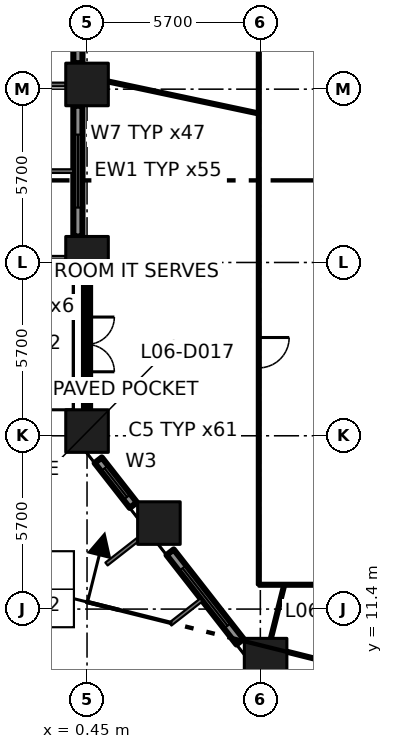
"""IFC4 building model, lengths in metres.
Left out: names, types, materials, properties, quantities, classifications, styles, units other than length and angle.
Written with IfcOpenShell. Run it as: python <this file> out.ifc"""

import sys

from ifc_helpers import new_model, si_unit, direction, frame, frame_2d, origin, origin_2d, place, context, subcontext, project, spatial, rectangle, extrude, element, fill, save


model = new_model("IFC4")
c1 = context("Model", 3, precision=1e-05, world=origin(), true_north=direction((0.0, 1.0)))
c2 = subcontext(c1, "Body", "Model", "MODEL_VIEW")
j1 = project(units=[si_unit("LENGTHUNIT", "METRE"), si_unit("PLANEANGLEUNIT", "RADIAN")], contexts=[c1])
p1 = place(None, origin())
s1 = spatial("IfcSite", under=j1, at=p1, CompositionType="ELEMENT")
p2 = place(p1, origin())
s2 = spatial("IfcBuilding", under=s1, at=p2, CompositionType="ELEMENT")
p3 = place(p2, frame((0.0, 0.0, 33.0)))
s3 = spatial("IfcBuildingStorey", under=s2, at=p3, CompositionType="ELEMENT", Elevation=33.0)
for number, where, z_axis, x_axis in (
    (1, (0.45, 17.255, 0.0), (0.0, 0.0, 1.0), (1.0, 0.0, 0.0)),
    (2, (0.45, 22.955, 0.0), (0.0, 0.0, 1.0), (1.0, 0.0, 0.0)),
    (3, (0.45, 28.655, 0.0), (0.0, 0.0, 1.0), (1.0, 0.0, 0.0)),
    (4, (6.323, 9.737, 0.0), (0.0, 0.0, 1.0), (1.0, 0.0, 0.0)),
    (5, (2.814, 14.229, 0.0), (0.0, 0.0, 1.0), (1.0, 0.0, 0.0)),
):
    element("IfcColumn", number, at=place(p3, frame(where, z_axis=z_axis, x_axis=x_axis)), inside=s3, PredefinedType="COLUMN", context=c2, shape_type="SweptSolid", body=[
        extrude(rectangle(XDim=1.4, YDim=1.4, at=origin_2d()), origin(), (0.0, 0.0, 1.0), 4.2),
    ])
p4 = place(p3, frame((0.15, 33.655, 0.0), z_axis=(0.0, 0.0, 1.0), x_axis=(0.0, -1.0, 0.0)))
e6 = element("IfcWall", 6, at=p4, inside=s3, PredefinedType="SOLIDWALL", context=c2, shape_type="SweptSolid", body=[
    extrude(rectangle(XDim=4.3, YDim=0.3, at=frame_2d((2.15, 0.0))), origin(), (0.0, 0.0, 1.0), 3.1),
])
p5 = place(p4, frame((0.95, 0.0, 0.8)))
e7 = element("IfcOpeningElement", 7, at=p5, cuts=e6, PredefinedType="OPENING", context=c2, shape_type="SweptSolid", body=[
    extrude(rectangle(XDim=2.4, YDim=2.1, at=frame_2d((1.2, 1.05))), frame((0.0, 0.16, 0.0), z_axis=(0.0, -1.0, 0.0), x_axis=(1.0, 0.0, 0.0)), (0.0, 0.0, 1.0), 0.32),
])
p6 = place(p3, frame((0.15, 27.955, 0.0), z_axis=(0.0, 0.0, 1.0), x_axis=(0.0, -1.0, 0.0)))
e8 = element("IfcWall", 8, at=p6, inside=s3, PredefinedType="SOLIDWALL", context=c2, shape_type="SweptSolid", body=[
    extrude(rectangle(XDim=4.3, YDim=0.3, at=frame_2d((2.15, 0.0))), origin(), (0.0, 0.0, 1.0), 3.1),
])
p7 = place(p6, frame((0.95, 0.0, 0.8)))
e9 = element("IfcOpeningElement", 9, at=p7, cuts=e8, PredefinedType="OPENING", context=c2, shape_type="SweptSolid", body=[
    extrude(rectangle(XDim=2.4, YDim=2.1, at=frame_2d((1.2, 1.05))), frame((0.0, 0.16, 0.0), z_axis=(0.0, -1.0, 0.0), x_axis=(1.0, 0.0, 0.0)), (0.0, 0.0, 1.0), 0.32),
])
p8 = place(p3, frame((0.45, 22.254, 0.0), z_axis=(0.0, 0.0, 1.0), x_axis=(0.0, -1.0, 0.0)))
e10 = element("IfcWall", 10, at=p8, inside=s3, PredefinedType="SOLIDWALL", context=c2, shape_type="SweptSolid", body=[
    extrude(rectangle(XDim=4.298, YDim=0.2, at=frame_2d((2.149, 0.0))), origin(), (0.0, 0.0, 1.0), 3.1),
])
p9 = place(p8, frame((1.249, 0.0, 0.0)))
e11 = element("IfcOpeningElement", 11, at=p9, cuts=e10, PredefinedType="OPENING", context=c2, shape_type="SweptSolid", body=[
    extrude(rectangle(XDim=1.8, YDim=2.9, at=frame_2d((0.9, 1.45))), frame((0.0, 0.11, 0.0), z_axis=(0.0, -1.0, 0.0), x_axis=(1.0, 0.0, 0.0)), (0.0, 0.0, 1.0), 0.22),
])
p10 = place(p3, frame((0.818, 16.296, 0.0), z_axis=(0.0, 0.0, 1.0), x_axis=(0.615985155343, -0.787757759973, 0.0)))
e12 = element("IfcWall", 12, at=p10, inside=s3, PredefinedType="SOLIDWALL", context=c2, shape_type="SweptSolid", body=[
    extrude(rectangle(XDim=1.875, YDim=0.3, at=frame_2d((0.938, 0.0))), origin(), (0.0, 0.0, 1.0), 3.1),
])
p11 = place(p10, frame((0.337, 0.0, 0.8)))
e13 = element("IfcOpeningElement", 13, at=p11, cuts=e12, PredefinedType="OPENING", context=c2, shape_type="SweptSolid", body=[
    extrude(rectangle(XDim=1.2, YDim=2.1, at=frame_2d((0.6, 1.05))), frame((0.0, 0.16, 0.0), z_axis=(0.0, -1.0, 0.0), x_axis=(1.0, 0.0, 0.0)), (0.0, 0.0, 1.0), 0.32),
])
p12 = place(p3, frame((3.183, 13.27, 0.0), z_axis=(0.0, 0.0, 1.0), x_axis=(0.615564114897, -0.788086810225, 0.0)))
e14 = element("IfcWall", 14, at=p12, inside=s3, PredefinedType="SOLIDWALL", context=c2, shape_type="SweptSolid", body=[
    extrude(rectangle(XDim=3.735, YDim=0.3, at=frame_2d((1.867, 0.0))), origin(), (0.0, 0.0, 1.0), 3.1),
])
p13 = place(p12, frame((0.667, 0.0, 0.8)))
e15 = element("IfcOpeningElement", 15, at=p13, cuts=e14, PredefinedType="OPENING", context=c2, shape_type="SweptSolid", body=[
    extrude(rectangle(XDim=2.4, YDim=2.1, at=frame_2d((1.2, 1.05))), frame((0.0, 0.16, 0.0), z_axis=(0.0, -1.0, 0.0), x_axis=(1.0, 0.0, 0.0)), (0.0, 0.0, 1.0), 0.32),
])
p14 = place(p3, frame((11.707, -11.659, 0.0), z_axis=(0.0, 0.0, 1.0), x_axis=(-0.61565155533, 0.788018503856, 0.0)))
e16 = element("IfcWall", 16, at=p14, inside=s3, PredefinedType="PARAPET", context=c2, shape_type="SweptSolid", body=[
    extrude(rectangle(XDim=32.79, YDim=0.25, at=frame_2d((16.395, 0.0))), origin(), (0.0, 0.0, 1.0), 1.2),
])
for number, where, z_axis, x_axis in (
    (17, (-0.25, 22.855, 0.0), (0.0, 0.0, 1.0), (-1.0, 0.0, 0.0)),
    (18, (-0.25, 17.355, 0.0), (0.0, 0.0, 1.0), (-1.0, 0.0, 0.0)),
):
    element("IfcWall", number, at=place(p3, frame(where, z_axis=z_axis, x_axis=x_axis)), inside=s3, PredefinedType="SOLIDWALL", context=c2, shape_type="SweptSolid", body=[
        extrude(rectangle(XDim=2.65, YDim=1.2, at=frame_2d((1.325, 0.0))), origin(), (0.0, 0.0, 1.0), 0.6),
    ])
p15 = place(p3, frame((6.1, 12.2, 0.0), z_axis=(0.0, 0.0, 1.0), x_axis=(1.0, 0.0, 0.0)))
e19 = element("IfcWall", 19, at=p15, inside=s3, PredefinedType="PARTITIONING", context=c2, shape_type="SweptSolid", body=[
    extrude(rectangle(XDim=3.8, YDim=0.1, at=frame_2d((1.9, 0.0))), origin(), (0.0, 0.0, 1.0), 3.9),
])
p16 = place(p15, frame((1.902, 0.0, 0.0)))
e20 = element("IfcOpeningElement", 20, at=p16, cuts=e19, PredefinedType="OPENING", context=c2, shape_type="SweptSolid", body=[
    extrude(rectangle(XDim=1.0, YDim=2.1, at=frame_2d((0.5, 1.05))), frame((0.0, 0.06, 0.0), z_axis=(0.0, -1.0, 0.0), x_axis=(1.0, 0.0, 0.0)), (0.0, 0.0, 1.0), 0.12),
])
p17 = place(p3, frame((6.1, 38.9, 0.0), z_axis=(0.0, 0.0, 1.0), x_axis=(0.0, -1.0, 0.0)))
e21 = element("IfcWall", 21, at=p17, inside=s3, PredefinedType="PARTITIONING", context=c2, shape_type="SweptSolid", body=[
    extrude(rectangle(XDim=26.7, YDim=0.1, at=frame_2d((13.35, 0.0))), origin(), (0.0, 0.0, 1.0), 3.9),
])
p18 = place(p17, frame((18.568, 0.0, 0.0)))
e22 = element("IfcOpeningElement", 22, at=p18, cuts=e21, PredefinedType="OPENING", context=c2, shape_type="SweptSolid", body=[
    extrude(rectangle(XDim=1.0, YDim=2.1, at=frame_2d((0.5, 1.05))), frame((0.0, 0.06, 0.0), z_axis=(0.0, -1.0, 0.0), x_axis=(1.0, 0.0, 0.0)), (0.0, 0.0, 1.0), 0.12),
])
p19 = place(p17, frame((4.68, 0.0, 0.0)))
e23 = element("IfcOpeningElement", 23, at=p19, cuts=e21, PredefinedType="OPENING", context=c2, shape_type="SweptSolid", body=[
    extrude(rectangle(XDim=1.8, YDim=2.1, at=frame_2d((0.9, 1.05))), frame((0.0, 0.06, 0.0), z_axis=(0.0, -1.0, 0.0), x_axis=(1.0, 0.0, 0.0)), (0.0, 0.0, 1.0), 0.12),
])
p20 = place(p3, frame((6.04, 27.712, 0.0), z_axis=(0.0, 0.0, 1.0), x_axis=(-0.978162574156, 0.207841233929, 0.0)))
e24 = element("IfcWall", 24, at=p20, inside=s3, PredefinedType="PARTITIONING", context=c2, shape_type="SweptSolid", body=[
    extrude(rectangle(XDim=4.999, YDim=0.1, at=frame_2d((2.5, 0.0))), origin(), (0.0, 0.0, 1.0), 3.9),
])
p21 = place(p3, frame((6.922, 12.138, 0.0), z_axis=(0.0, 0.0, 1.0), x_axis=(-0.242437328426, -0.970167069007, 0.0)))
e25 = element("IfcWall", 25, at=p21, inside=s3, PredefinedType="PARTITIONING", context=c2, shape_type="SweptSolid", body=[
    extrude(rectangle(XDim=1.753, YDim=0.1, at=frame_2d((0.876, 0.0))), origin(), (0.0, 0.0, 1.0), 3.9),
])
p22 = place(p3, frame((8.72, 9.574, 0.0), z_axis=(0.0, 0.0, 1.0), x_axis=(-0.97016712555, 0.242437102155, 0.0)))
e26 = element("IfcWall", 26, at=p22, inside=s3, PredefinedType="PARTITIONING", context=c2, shape_type="SweptSolid", body=[
    extrude(rectangle(XDim=1.749, YDim=0.1, at=frame_2d((0.875, 0.0))), origin(), (0.0, 0.0, 1.0), 3.9),
])
p23 = place(p7, origin())
e27 = element("IfcWindow", 27, at=p23, inside=s3, PartitioningType="DOUBLE_PANEL_VERTICAL", PredefinedType="WINDOW", context=c2, shape_type="SweptSolid", body=[
    extrude(rectangle(XDim=2.4, YDim=2.1, at=frame_2d((1.2, 1.05))), frame((0.0, 0.03, 0.0), z_axis=(0.0, -1.0, 0.0), x_axis=(1.0, 0.0, 0.0)), (0.0, 0.0, 1.0), 0.06),
])
fill(e9, e27)
p24 = place(p9, origin())
e28 = element("IfcDoor", 28, at=p24, inside=s3, OperationType="DOUBLE_DOOR_SINGLE_SWING", PredefinedType="DOOR", context=c2, shape_type="SweptSolid", body=[
    extrude(rectangle(XDim=1.8, YDim=2.9, at=frame_2d((0.9, 1.45))), frame((0.0, 0.025, 0.0), z_axis=(0.0, -1.0, 0.0), x_axis=(1.0, 0.0, 0.0)), (0.0, 0.0, 1.0), 0.05),
])
fill(e11, e28)
p25 = place(p11, origin())
e29 = element("IfcWindow", 29, at=p25, inside=s3, PartitioningType="SINGLE_PANEL", PredefinedType="WINDOW", context=c2, shape_type="SweptSolid", body=[
    extrude(rectangle(XDim=1.2, YDim=2.1, at=frame_2d((0.6, 1.05))), frame((0.0, 0.03, 0.0), z_axis=(0.0, -1.0, 0.0), x_axis=(1.0, 0.0, 0.0)), (0.0, 0.0, 1.0), 0.06),
])
fill(e13, e29)
p26 = place(p13, origin())
e30 = element("IfcWindow", 30, at=p26, inside=s3, PartitioningType="DOUBLE_PANEL_VERTICAL", PredefinedType="WINDOW", context=c2, shape_type="SweptSolid", body=[
    extrude(rectangle(XDim=2.4, YDim=2.1, at=frame_2d((1.2, 1.05))), frame((0.0, 0.03, 0.0), z_axis=(0.0, -1.0, 0.0), x_axis=(1.0, 0.0, 0.0)), (0.0, 0.0, 1.0), 0.06),
])
fill(e15, e30)
p27 = place(p18, origin())
e31 = element("IfcDoor", 31, at=p27, inside=s3, OperationType="SINGLE_SWING_LEFT", PredefinedType="DOOR", context=c2, shape_type="SweptSolid", body=[
    extrude(rectangle(XDim=1.0, YDim=2.1, at=frame_2d((0.5, 1.05))), frame((0.0, 0.025, 0.0), z_axis=(0.0, -1.0, 0.0), x_axis=(1.0, 0.0, 0.0)), (0.0, 0.0, 1.0), 0.05),
])
fill(e22, e31)
save(model, sys.argv[1])
